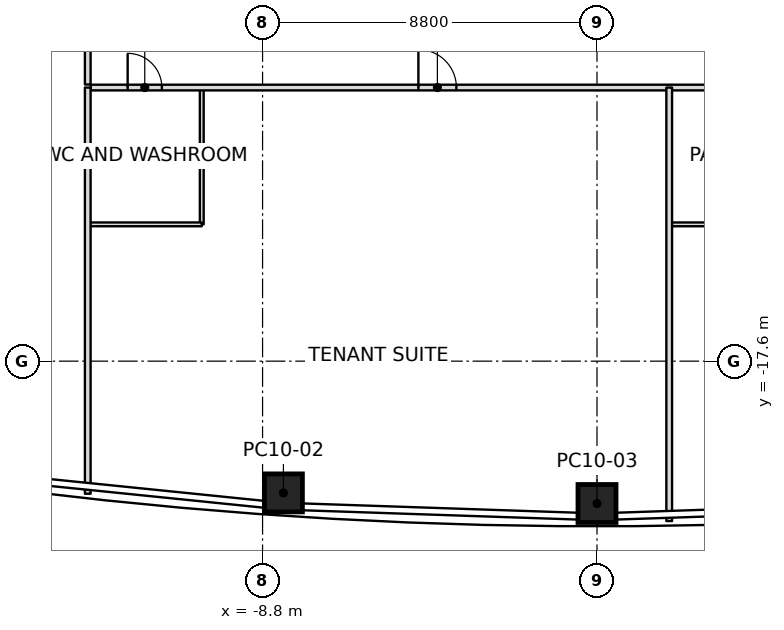
"""IFC4 building model, lengths in metres.
Left out: names, types, materials, properties, quantities, classifications, styles, units other than length and angle.
Written with IfcOpenShell. Run it as: python <this file> out.ifc"""

import sys

from ifc_helpers import new_model, si_unit, direction, frame, frame_2d, origin, origin_2d, place, context, subcontext, project, spatial, rectangle, extrude, element, fill, save


model = new_model("IFC4")
c1 = context("Model", 3, precision=1e-05, world=origin(), true_north=direction((0.0, 1.0)))
c2 = subcontext(c1, "Body", "Model", "MODEL_VIEW")
j1 = project(units=[si_unit("LENGTHUNIT", "METRE"), si_unit("PLANEANGLEUNIT", "RADIAN")], contexts=[c1])
p1 = place(None, origin())
s1 = spatial("IfcSite", under=j1, at=p1, CompositionType="ELEMENT")
p2 = place(p1, origin())
s2 = spatial("IfcBuilding", under=s1, at=p2, CompositionType="ELEMENT")
p3 = place(p2, frame((0.0, 0.0, 181.8)))
s3 = spatial("IfcBuildingStorey", under=s2, at=p3, CompositionType="ELEMENT", Elevation=181.8)
p4 = place(p3, frame((-8.252, -21.067, 0.0), z_axis=(0.008788174922, 0.01116830563, 0.999899013366), x_axis=(-0.997677690946, 0.0676388512, 0.008013163924)))
e1 = element("IfcColumn", 1, at=p4, inside=s3, PredefinedType="COLUMN", context=c2, shape_type="SweptSolid", body=[
    extrude(rectangle(XDim=1.0, YDim=1.0, at=origin_2d()), origin(), (0.0, 0.0, 1.0), 4.0),
])
p5 = place(p3, frame((0.0, -21.346, 0.0), z_axis=(0.0, 0.01141283087, 0.999934871525), x_axis=(1.0, 0.0, 0.0)))
e2 = element("IfcColumn", 2, at=p5, inside=s3, PredefinedType="COLUMN", context=c2, shape_type="SweptSolid", body=[
    extrude(rectangle(XDim=1.0, YDim=1.0, at=origin_2d()), origin(), (0.0, 0.0, 1.0), 4.0),
])
p6 = place(p3, frame((-13.4, -10.4, 0.0), z_axis=(0.0, 0.0, 1.0), x_axis=(0.0, -1.0, 0.0)))
e3 = element("IfcWall", 3, at=p6, inside=s3, PredefinedType="PARTITIONING", context=c2, shape_type="SweptSolid", body=[
    extrude(rectangle(XDim=10.688, YDim=0.15, at=frame_2d((5.344, 0.0))), origin(), (0.0, 0.0, 1.0), 3.234),
])
p7 = place(p3, frame((1.9, -10.4, 0.0), z_axis=(0.0, 0.0, 1.0), x_axis=(0.0, -1.0, 0.0)))
e4 = element("IfcWall", 4, at=p7, inside=s3, PredefinedType="PARTITIONING", context=c2, shape_type="SweptSolid", body=[
    extrude(rectangle(XDim=11.407, YDim=0.15, at=frame_2d((5.704, 0.0))), origin(), (0.0, 0.0, 1.0), 3.234),
])
p8 = place(p3, frame((-13.4, 10.32, 0.0), z_axis=(0.0, 0.0, 1.0), x_axis=(0.0, -1.0, 0.0)))
e5 = element("IfcWall", 5, at=p8, inside=s3, PredefinedType="PARTITIONING", context=c2, shape_type="SweptSolid", body=[
    extrude(rectangle(XDim=20.64, YDim=0.15, at=frame_2d((10.32, 0.0))), origin(), (0.0, 0.0, 1.0), 3.166),
])
p9 = place(p8, frame((3.32, 0.0, 0.0)))
e6 = element("IfcOpeningElement", 6, at=p9, cuts=e5, PredefinedType="OPENING", context=c2, shape_type="SweptSolid", body=[
    extrude(rectangle(XDim=1.0, YDim=2.1, at=frame_2d((0.5, 1.05))), frame((0.0, 0.075, 0.0), z_axis=(0.0, -1.0, 0.0), x_axis=(1.0, 0.0, 0.0)), (0.0, 0.0, 1.0), 0.15),
])
p10 = place(p8, frame((9.77, 0.0, 0.0)))
e7 = element("IfcOpeningElement", 7, at=p10, cuts=e5, PredefinedType="OPENING", context=c2, shape_type="SweptSolid", body=[
    extrude(rectangle(XDim=0.9, YDim=2.1, at=frame_2d((0.45, 1.05))), frame((0.0, 0.075, 0.0), z_axis=(0.0, -1.0, 0.0), x_axis=(1.0, 0.0, 0.0)), (0.0, 0.0, 1.0), 0.15),
])
p11 = place(p8, frame((16.28, 0.0, 0.0)))
e8 = element("IfcOpeningElement", 8, at=p11, cuts=e5, PredefinedType="OPENING", context=c2, shape_type="SweptSolid", body=[
    extrude(rectangle(XDim=1.0, YDim=2.1, at=frame_2d((0.5, 1.05))), frame((0.0, 0.075, 0.0), z_axis=(0.0, -1.0, 0.0), x_axis=(1.0, 0.0, 0.0)), (0.0, 0.0, 1.0), 0.15),
])
p12 = place(p3, frame((-13.32, -10.4, 0.0), z_axis=(0.0, 0.0, 1.0), x_axis=(1.0, 0.0, 0.0)))
e9 = element("IfcWall", 9, at=p12, inside=s3, PredefinedType="PARTITIONING", context=c2, shape_type="SweptSolid", body=[
    extrude(rectangle(XDim=26.64, YDim=0.15, at=frame_2d((13.32, 0.0))), origin(), (0.0, 0.0, 1.0), 3.317),
])
p13 = place(p12, frame((0.97, 0.0, 0.0)))
e10 = element("IfcOpeningElement", 10, at=p13, cuts=e9, PredefinedType="OPENING", context=c2, shape_type="SweptSolid", body=[
    extrude(rectangle(XDim=0.9, YDim=2.1, at=frame_2d((0.45, 1.05))), frame((0.0, 0.075, 0.0), z_axis=(0.0, -1.0, 0.0), x_axis=(1.0, 0.0, 0.0)), (0.0, 0.0, 1.0), 0.15),
])
p14 = place(p12, frame((8.62, 0.0, 0.0)))
e11 = element("IfcOpeningElement", 11, at=p14, cuts=e9, PredefinedType="OPENING", context=c2, shape_type="SweptSolid", body=[
    extrude(rectangle(XDim=1.0, YDim=2.1, at=frame_2d((0.5, 1.05))), frame((0.0, 0.075, 0.0), z_axis=(0.0, -1.0, 0.0), x_axis=(1.0, 0.0, 0.0)), (0.0, 0.0, 1.0), 0.15),
])
p15 = place(p12, frame((16.27, 0.0, 0.0)))
e12 = element("IfcOpeningElement", 12, at=p15, cuts=e9, PredefinedType="OPENING", context=c2, shape_type="SweptSolid", body=[
    extrude(rectangle(XDim=0.9, YDim=2.1, at=frame_2d((0.45, 1.05))), frame((0.0, 0.075, 0.0), z_axis=(0.0, -1.0, 0.0), x_axis=(1.0, 0.0, 0.0)), (0.0, 0.0, 1.0), 0.15),
])
p16 = place(p12, frame((22.02, 0.0, 0.0)))
e13 = element("IfcOpeningElement", 13, at=p16, cuts=e9, PredefinedType="OPENING", context=c2, shape_type="SweptSolid", body=[
    extrude(rectangle(XDim=1.0, YDim=2.1, at=frame_2d((0.5, 1.05))), frame((0.0, 0.075, 0.0), z_axis=(0.0, -1.0, 0.0), x_axis=(1.0, 0.0, 0.0)), (0.0, 0.0, 1.0), 0.15),
])
p17 = place(p3, frame((-10.4, -10.43, 0.0), z_axis=(0.0, 0.0, 1.0), x_axis=(0.0, -1.0, 0.0)))
e14 = element("IfcWall", 14, at=p17, inside=s3, PredefinedType="PARTITIONING", context=c2, shape_type="SweptSolid", body=[
    extrude(rectangle(XDim=3.57, YDim=0.1, at=frame_2d((1.785, 0.0))), origin(), (0.0, 0.0, 1.0), 3.45),
])
p18 = place(p3, frame((-10.4, -14.0, 0.0), z_axis=(0.0, 0.0, 1.0), x_axis=(-1.0, 0.0, 0.0)))
e15 = element("IfcWall", 15, at=p18, inside=s3, PredefinedType="PARTITIONING", context=c2, shape_type="SweptSolid", body=[
    extrude(rectangle(XDim=2.97, YDim=0.1, at=frame_2d((1.485, 0.0))), origin(), (0.0, 0.0, 1.0), 3.393),
])
p19 = place(p3, frame((4.9, -14.0, 0.0), z_axis=(0.0, 0.0, 1.0), x_axis=(-1.0, 0.0, 0.0)))
e16 = element("IfcWall", 16, at=p19, inside=s3, PredefinedType="PARTITIONING", context=c2, shape_type="SweptSolid", body=[
    extrude(rectangle(XDim=2.97, YDim=0.1, at=frame_2d((1.485, 0.0))), origin(), (0.0, 0.0, 1.0), 3.317),
])
p20 = place(p13, origin())
e17 = element("IfcDoor", 17, at=p20, inside=s3, OperationType="SINGLE_SWING_LEFT", PredefinedType="DOOR", context=c2, shape_type="SweptSolid", body=[
    extrude(rectangle(XDim=0.9, YDim=2.1, at=frame_2d((0.45, 1.05))), frame((0.0, 0.025, 0.0), z_axis=(0.0, -1.0, 0.0), x_axis=(1.0, 0.0, 0.0)), (0.0, 0.0, 1.0), 0.05),
])
fill(e10, e17)
p21 = place(p14, origin())
e18 = element("IfcDoor", 18, at=p21, inside=s3, OperationType="SINGLE_SWING_LEFT", PredefinedType="DOOR", context=c2, shape_type="SweptSolid", body=[
    extrude(rectangle(XDim=1.0, YDim=2.1, at=frame_2d((0.5, 1.05))), frame((0.0, 0.025, 0.0), z_axis=(0.0, -1.0, 0.0), x_axis=(1.0, 0.0, 0.0)), (0.0, 0.0, 1.0), 0.05),
])
fill(e11, e18)
save(model, sys.argv[1])
